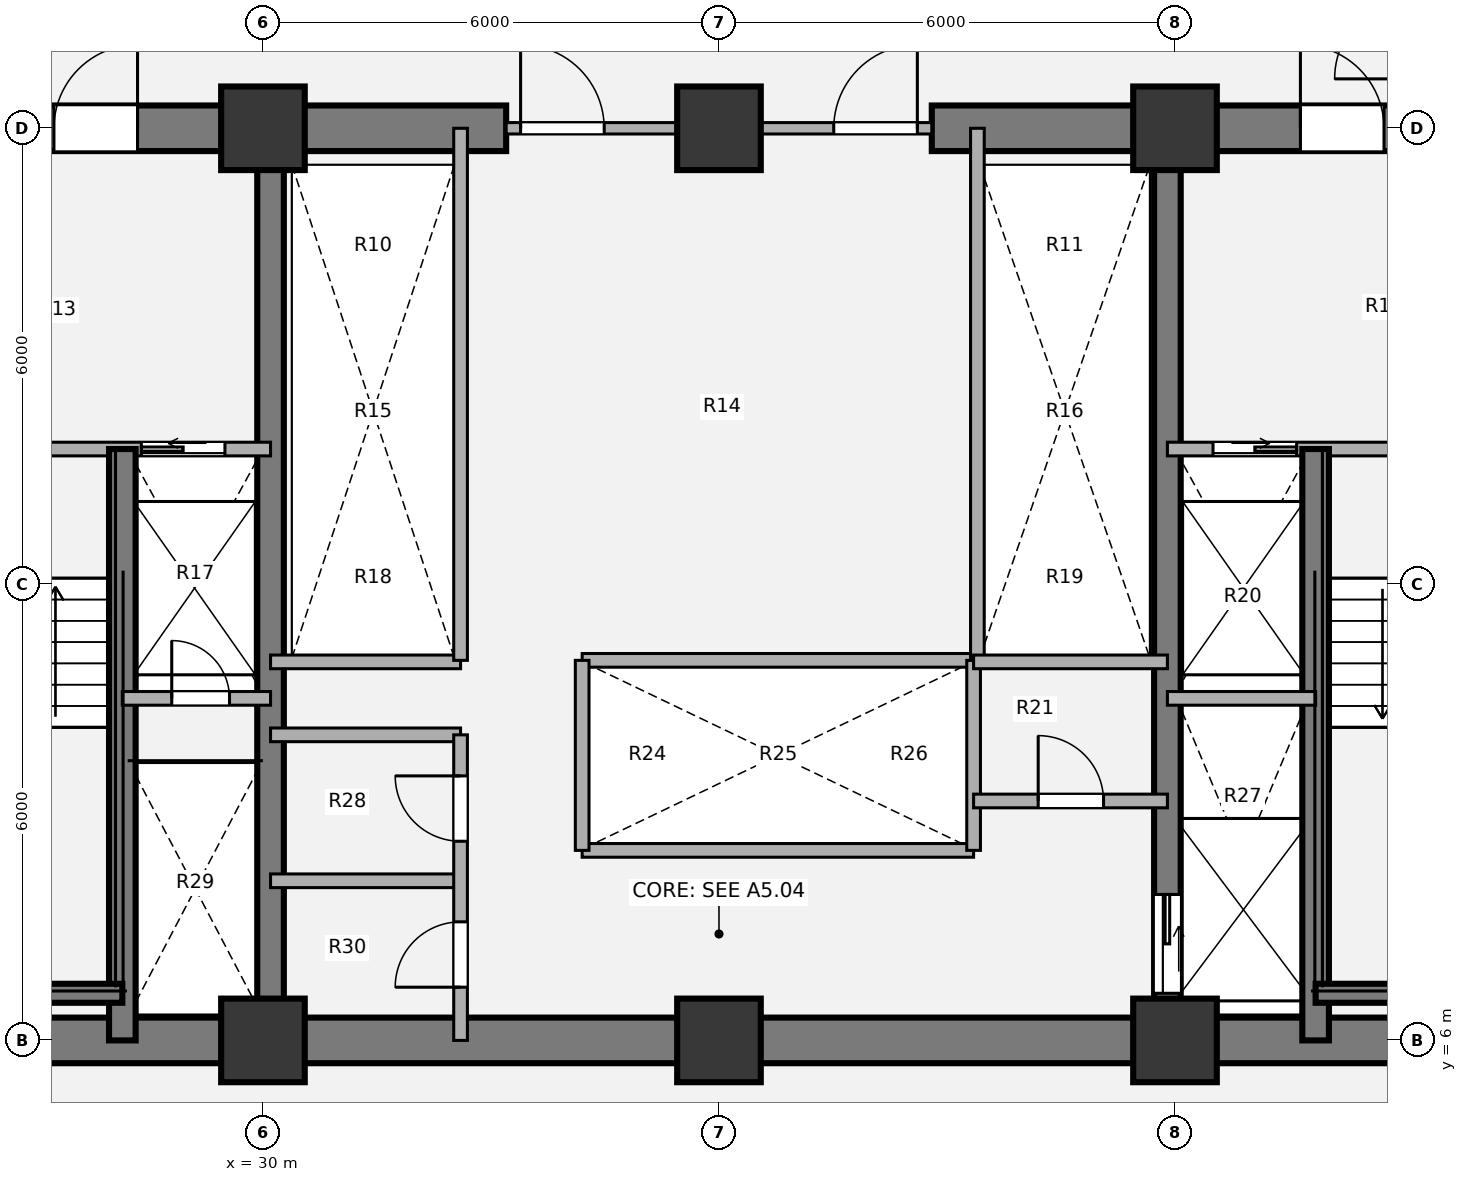
"""IFC4 building model, lengths in metres.
Left out: names, types, materials, properties, quantities, classifications, styles, units other than length and angle.
Written with IfcOpenShell. Run it as: python <this file> out.ifc"""

import sys

from ifc_helpers import new_model, si_unit, direction, frame, frame_2d, origin, origin_2d, place, context, subcontext, project, spatial, rectangle, extrude, source, transform, mapped, element, fill, save


model = new_model("IFC4")
c1 = context("Model", 3, precision=1e-05, world=origin(), true_north=direction((0.0, 1.0)))
c2 = subcontext(c1, "Body", "Model", "MODEL_VIEW")
j1 = project(units=[si_unit("LENGTHUNIT", "METRE"), si_unit("PLANEANGLEUNIT", "RADIAN")], contexts=[c1])
p1 = place(None, origin())
s1 = spatial("IfcSite", under=j1, at=p1, CompositionType="ELEMENT")
p2 = place(p1, origin())
s2 = spatial("IfcBuilding", under=s1, at=p2, CompositionType="ELEMENT")
p3 = place(p2, frame((0.0, 0.0, 79.92)))
s3 = spatial("IfcBuildingStorey", under=s2, at=p3, CompositionType="ELEMENT", Elevation=79.92)
m1 = source(origin(), c2, "Body", "SweptSolid", [
    extrude(rectangle(XDim=1.1, YDim=1.1, at=origin_2d()), origin(), (0.0, 0.0, 1.0), 5.4),
])
for number, where, z_axis, x_axis in (
    (1, (30.0, 6.0, 0.0), (0.0, 0.0, 1.0), (1.0, 0.0, 0.0)),
    (2, (36.0, 6.0, 0.0), (0.0, 0.0, 1.0), (1.0, 0.0, 0.0)),
    (3, (42.0, 6.0, 0.0), (0.0, 0.0, 1.0), (1.0, 0.0, 0.0)),
    (4, (30.0, 18.0, 0.0), (0.0, 0.0, 1.0), (1.0, 0.0, 0.0)),
    (5, (36.0, 18.0, 0.0), (0.0, 0.0, 1.0), (1.0, 0.0, 0.0)),
    (6, (42.0, 18.0, 0.0), (0.0, 0.0, 1.0), (1.0, 0.0, 0.0)),
):
    element("IfcColumn", number, at=place(p3, frame(where, z_axis=z_axis, x_axis=x_axis)), inside=s3, PredefinedType="COLUMN", context=c2, shape_type="MappedRepresentation", body=[
        mapped(m1, transform((0.0, 0.0, 0.0), x_axis=(1.0, 0.0, 0.0), y_axis=(0.0, 1.0, 0.0), z_axis=(0.0, 0.0, 1.0), scale=1.0)),
    ])
p4 = place(p3, frame((48.3, 6.0, 0.0), z_axis=(0.0, 0.0, 1.0), x_axis=(-1.0, 0.0, 0.0)))
e7 = element("IfcWall", 7, at=p4, inside=s3, PredefinedType="SHEAR", context=c2, shape_type="SweptSolid", body=[
    extrude(rectangle(XDim=24.6, YDim=0.6, at=frame_2d((12.3, 0.0))), origin(), (0.0, 0.0, 1.0), 5.4),
])
p5 = place(p3, frame((23.7, 18.0, 0.0), z_axis=(0.0, 0.0, 1.0), x_axis=(1.0, 0.0, 0.0)))
e8 = element("IfcWall", 8, at=p5, inside=s3, PredefinedType="SHEAR", context=c2, shape_type="SweptSolid", body=[
    extrude(rectangle(XDim=9.5, YDim=0.6, at=frame_2d((4.75, 0.0))), origin(), (0.0, 0.0, 1.0), 5.4),
])
p6 = place(p5, frame((1.55, 0.0, 0.0)))
e9 = element("IfcOpeningElement", 9, at=p6, cuts=e8, PredefinedType="OPENING", context=c2, shape_type="SweptSolid", body=[
    extrude(rectangle(XDim=1.1, YDim=2.1, at=origin_2d()), frame((0.55, 0.31, 1.05), z_axis=(0.0, -1.0, 0.0), x_axis=(1.0, 0.0, 0.0)), (0.0, 0.0, 1.0), 0.62),
])
p7 = place(p5, frame((3.55, 0.0, 0.0)))
e10 = element("IfcOpeningElement", 10, at=p7, cuts=e8, PredefinedType="OPENING", context=c2, shape_type="SweptSolid", body=[
    extrude(rectangle(XDim=1.1, YDim=2.1, at=origin_2d()), frame((0.55, 0.31, 1.05), z_axis=(0.0, -1.0, 0.0), x_axis=(1.0, 0.0, 0.0)), (0.0, 0.0, 1.0), 0.62),
])
p8 = place(p3, frame((38.8, 18.0, 0.0), z_axis=(0.0, 0.0, 1.0), x_axis=(1.0, 0.0, 0.0)))
e11 = element("IfcWall", 11, at=p8, inside=s3, PredefinedType="SHEAR", context=c2, shape_type="SweptSolid", body=[
    extrude(rectangle(XDim=9.5, YDim=0.6, at=frame_2d((4.75, 0.0))), origin(), (0.0, 0.0, 1.0), 5.4),
])
p9 = place(p8, frame((4.85, 0.0, 0.0)))
e12 = element("IfcOpeningElement", 12, at=p9, cuts=e11, PredefinedType="OPENING", context=c2, shape_type="SweptSolid", body=[
    extrude(rectangle(XDim=1.1, YDim=2.1, at=origin_2d()), frame((0.55, 0.31, 1.05), z_axis=(0.0, -1.0, 0.0), x_axis=(1.0, 0.0, 0.0)), (0.0, 0.0, 1.0), 0.62),
])
p10 = place(p8, frame((6.85, 0.0, 0.0)))
e13 = element("IfcOpeningElement", 13, at=p10, cuts=e11, PredefinedType="OPENING", context=c2, shape_type="SweptSolid", body=[
    extrude(rectangle(XDim=1.1, YDim=2.1, at=origin_2d()), frame((0.55, 0.31, 1.05), z_axis=(0.0, -1.0, 0.0), x_axis=(1.0, 0.0, 0.0)), (0.0, 0.0, 1.0), 0.62),
])
p11 = place(p3, frame((30.1, 6.0, 0.0), z_axis=(0.0, 0.0, 1.0), x_axis=(0.0, 1.0, 0.0)))
e14 = element("IfcWall", 14, at=p11, inside=s3, PredefinedType="SHEAR", context=c2, shape_type="SweptSolid", body=[
    extrude(rectangle(XDim=12.0, YDim=0.35, at=frame_2d((6.0, 0.0))), origin(), (0.0, 0.0, 1.0), 5.4),
])
p12 = place(p3, frame((41.9, 18.0, 0.0), z_axis=(0.0, 0.0, 1.0), x_axis=(0.0, -1.0, 0.0)))
e15 = element("IfcWall", 15, at=p12, inside=s3, PredefinedType="SHEAR", context=c2, shape_type="SweptSolid", body=[
    extrude(rectangle(XDim=12.0, YDim=0.35, at=frame_2d((6.0, 0.0))), origin(), (0.0, 0.0, 1.0), 5.4),
])
p13 = place(p12, frame((10.08, 0.0, 0.0)))
e16 = element("IfcOpeningElement", 16, at=p13, cuts=e15, PredefinedType="OPENING", context=c2, shape_type="SweptSolid", body=[
    extrude(rectangle(XDim=1.3, YDim=2.1, at=origin_2d()), frame((0.65, 0.185, 1.05), z_axis=(0.0, -1.0, 0.0), x_axis=(1.0, 0.0, 0.0)), (0.0, 0.0, 1.0), 0.37),
])
for number, where, z_axis, x_axis in (
    (17, (34.2, 11.0, 0.0), (0.0, 0.0, 1.0), (1.0, 0.0, 0.0)),
    (18, (34.2, 8.5, 0.0), (0.0, 0.0, 1.0), (1.0, 0.0, 0.0)),
):
    element("IfcWall", number, at=place(p3, frame(where, z_axis=z_axis, x_axis=x_axis)), inside=s3, PredefinedType="PARTITIONING", context=c2, shape_type="SweptSolid", body=[
        extrude(rectangle(XDim=5.15, YDim=0.18, at=frame_2d((2.575, 0.0))), origin(), (0.0, 0.0, 1.0), 5.05),
    ])
for number, where, z_axis, x_axis in (
    (19, (34.2, 8.5, 0.0), (0.0, 0.0, 1.0), (0.0, 1.0, 0.0)),
    (20, (39.35, 8.5, 0.0), (0.0, 0.0, 1.0), (0.0, 1.0, 0.0)),
):
    element("IfcWall", number, at=place(p3, frame(where, z_axis=z_axis, x_axis=x_axis)), inside=s3, PredefinedType="PARTITIONING", context=c2, shape_type="SweptSolid", body=[
        extrude(rectangle(XDim=2.5, YDim=0.18, at=frame_2d((1.25, 0.0))), origin(), (0.0, 0.0, 1.0), 5.05),
    ])
p14 = place(p3, frame((39.4, 11.0, 0.0), z_axis=(0.0, 0.0, 1.0), x_axis=(0.0, 1.0, 0.0)))
e21 = element("IfcWall", 21, at=p14, inside=s3, PredefinedType="PARTITIONING", context=c2, shape_type="SweptSolid", body=[
    extrude(rectangle(XDim=7.0, YDim=0.18, at=frame_2d((3.5, 0.0))), origin(), (0.0, 0.0, 1.0), 5.05),
])
p15 = place(p3, frame((30.1, 10.98, 0.0), z_axis=(0.0, 0.0, 1.0), x_axis=(1.0, 0.0, 0.0)))
e22 = element("IfcWall", 22, at=p15, inside=s3, PredefinedType="PARTITIONING", context=c2, shape_type="SweptSolid", body=[
    extrude(rectangle(XDim=2.5, YDim=0.18, at=frame_2d((1.25, 0.0))), origin(), (0.0, 0.0, 1.0), 5.05),
])
p16 = place(p3, frame((39.35, 10.98, 0.0), z_axis=(0.0, 0.0, 1.0), x_axis=(1.0, 0.0, 0.0)))
e23 = element("IfcWall", 23, at=p16, inside=s3, PredefinedType="PARTITIONING", context=c2, shape_type="SweptSolid", body=[
    extrude(rectangle(XDim=2.55, YDim=0.18, at=frame_2d((1.275, 0.0))), origin(), (0.0, 0.0, 1.0), 5.05),
])
for number, where, z_axis, x_axis in (
    (24, (30.1, 8.1, 0.0), (0.0, 0.0, 1.0), (1.0, 0.0, 0.0)),
    (25, (30.1, 10.02, 0.0), (0.0, 0.0, 1.0), (1.0, 0.0, 0.0)),
):
    element("IfcWall", number, at=place(p3, frame(where, z_axis=z_axis, x_axis=x_axis)), inside=s3, PredefinedType="PARTITIONING", context=c2, shape_type="SweptSolid", body=[
        extrude(rectangle(XDim=2.5, YDim=0.18, at=frame_2d((1.25, 0.0))), origin(), (0.0, 0.0, 1.0), 5.05),
    ])
p17 = place(p3, frame((32.6, 6.0, 0.0), z_axis=(0.0, 0.0, 1.0), x_axis=(0.0, 1.0, 0.0)))
e26 = element("IfcWall", 26, at=p17, inside=s3, PredefinedType="PARTITIONING", context=c2, shape_type="SweptSolid", body=[
    extrude(rectangle(XDim=4.02, YDim=0.18, at=frame_2d((2.01, 0.0))), origin(), (0.0, 0.0, 1.0), 5.05),
])
p18 = place(p17, frame((0.7, 0.0, 0.0)))
e27 = element("IfcOpeningElement", 27, at=p18, cuts=e26, PredefinedType="OPENING", context=c2, shape_type="SweptSolid", body=[
    extrude(rectangle(XDim=0.86, YDim=2.1, at=origin_2d()), frame((0.43, 0.1, 1.05), z_axis=(0.0, -1.0, 0.0), x_axis=(1.0, 0.0, 0.0)), (0.0, 0.0, 1.0), 0.2),
])
p19 = place(p17, frame((2.62, 0.0, 0.0)))
e28 = element("IfcOpeningElement", 28, at=p19, cuts=e26, PredefinedType="OPENING", context=c2, shape_type="SweptSolid", body=[
    extrude(rectangle(XDim=0.86, YDim=2.1, at=origin_2d()), frame((0.43, 0.1, 1.05), z_axis=(0.0, -1.0, 0.0), x_axis=(1.0, 0.0, 0.0)), (0.0, 0.0, 1.0), 0.2),
])
p20 = place(p3, frame((39.35, 9.15, 0.0), z_axis=(0.0, 0.0, 1.0), x_axis=(1.0, 0.0, 0.0)))
e29 = element("IfcWall", 29, at=p20, inside=s3, PredefinedType="PARTITIONING", context=c2, shape_type="SweptSolid", body=[
    extrude(rectangle(XDim=2.55, YDim=0.18, at=frame_2d((1.275, 0.0))), origin(), (0.0, 0.0, 1.0), 5.05),
])
p21 = place(p20, frame((0.85, 0.0, 0.0)))
e30 = element("IfcOpeningElement", 30, at=p21, cuts=e29, PredefinedType="OPENING", context=c2, shape_type="SweptSolid", body=[
    extrude(rectangle(XDim=0.86, YDim=2.1, at=origin_2d()), frame((0.43, 0.1, 1.05), z_axis=(0.0, -1.0, 0.0), x_axis=(1.0, 0.0, 0.0)), (0.0, 0.0, 1.0), 0.2),
])
p22 = place(p3, frame((33.2, 18.0, 0.0), z_axis=(0.0, 0.0, 1.0), x_axis=(1.0, 0.0, 0.0)))
e31 = element("IfcWall", 31, at=p22, inside=s3, PredefinedType="PARTITIONING", context=c2, shape_type="SweptSolid", body=[
    extrude(rectangle(XDim=5.6, YDim=0.15, at=frame_2d((2.8, 0.0))), origin(), (0.0, 0.0, 1.0), 3.865),
])
p23 = place(p22, frame((0.19, 0.0, 0.0)))
e32 = element("IfcOpeningElement", 32, at=p23, cuts=e31, PredefinedType="OPENING", context=c2, shape_type="SweptSolid", body=[
    extrude(rectangle(XDim=1.1, YDim=2.1, at=origin_2d()), frame((0.55, 0.085, 1.05), z_axis=(0.0, -1.0, 0.0), x_axis=(1.0, 0.0, 0.0)), (0.0, 0.0, 1.0), 0.17),
])
p24 = place(p22, frame((4.31, 0.0, 0.0)))
e33 = element("IfcOpeningElement", 33, at=p24, cuts=e31, PredefinedType="OPENING", context=c2, shape_type="SweptSolid", body=[
    extrude(rectangle(XDim=1.1, YDim=2.1, at=origin_2d()), frame((0.55, 0.085, 1.05), z_axis=(0.0, -1.0, 0.0), x_axis=(1.0, 0.0, 0.0)), (0.0, 0.0, 1.0), 0.17),
])
p25 = place(p3, frame((24.0, 13.78, 0.0), z_axis=(0.0, 0.0, 1.0), x_axis=(1.0, 0.0, 0.0)))
e34 = element("IfcWall", 34, at=p25, inside=s3, PredefinedType="PARTITIONING", context=c2, shape_type="SweptSolid", body=[
    extrude(rectangle(XDim=6.1, YDim=0.18, at=frame_2d((3.05, 0.0))), origin(), (0.0, 0.0, 1.0), 2.229),
])
p26 = place(p25, frame((1.15, 0.0, 0.0)))
e35 = element("IfcOpeningElement", 35, at=p26, cuts=e34, PredefinedType="OPENING", context=c2, shape_type="SweptSolid", body=[
    extrude(rectangle(XDim=1.1, YDim=2.1, at=origin_2d()), frame((0.55, 0.1, 1.05), z_axis=(0.0, -1.0, 0.0), x_axis=(1.0, 0.0, 0.0)), (0.0, 0.0, 1.0), 0.2),
])
p27 = place(p25, frame((4.4, 0.0, 0.0)))
e36 = element("IfcOpeningElement", 36, at=p27, cuts=e34, PredefinedType="OPENING", context=c2, shape_type="SweptSolid", body=[
    extrude(rectangle(XDim=1.1, YDim=2.1, at=origin_2d()), frame((0.55, 0.1, 1.05), z_axis=(0.0, -1.0, 0.0), x_axis=(1.0, 0.0, 0.0)), (0.0, 0.0, 1.0), 0.2),
])
p28 = place(p3, frame((28.15, 6.0, 0.0), z_axis=(0.0, 0.0, 1.0), x_axis=(0.0, 1.0, 0.0)))
e37 = element("IfcWall", 37, at=p28, inside=s3, PredefinedType="SHEAR", context=c2, shape_type="SweptSolid", body=[
    extrude(rectangle(XDim=7.78, YDim=0.35, at=frame_2d((3.89, 0.0))), origin(), (0.0, 0.0, 1.0), 5.4),
])
p29 = place(p3, frame((24.58, 6.62, 0.0), z_axis=(0.0, 0.0, 1.0), x_axis=(1.0, 0.0, 0.0)))
e38 = element("IfcWall", 38, at=p29, inside=s3, PredefinedType="SHEAR", context=c2, shape_type="SweptSolid", body=[
    extrude(rectangle(XDim=3.57, YDim=0.25, at=frame_2d((1.785, 0.0))), origin(), (0.0, 0.0, 1.0), 5.4),
])
p30 = place(p3, frame((28.15, 10.5, 0.0), z_axis=(0.0, 0.0, 1.0), x_axis=(1.0, 0.0, 0.0)))
e39 = element("IfcWall", 39, at=p30, inside=s3, PredefinedType="PARTITIONING", context=c2, shape_type="SweptSolid", body=[
    extrude(rectangle(XDim=1.95, YDim=0.18, at=frame_2d((0.975, 0.0))), origin(), (0.0, 0.0, 1.0), 5.05),
])
p31 = place(p30, frame((0.65, 0.0, 0.0)))
e40 = element("IfcOpeningElement", 40, at=p31, cuts=e39, PredefinedType="OPENING", context=c2, shape_type="SweptSolid", body=[
    extrude(rectangle(XDim=0.76, YDim=2.05, at=origin_2d()), frame((0.38, 0.1, 1.025), z_axis=(0.0, -1.0, 0.0), x_axis=(1.0, 0.0, 0.0)), (0.0, 0.0, 1.0), 0.2),
])
p32 = place(p3, frame((41.9, 13.78, 0.0), z_axis=(0.0, 0.0, 1.0), x_axis=(1.0, 0.0, 0.0)))
e41 = element("IfcWall", 41, at=p32, inside=s3, PredefinedType="PARTITIONING", context=c2, shape_type="SweptSolid", body=[
    extrude(rectangle(XDim=6.1, YDim=0.18, at=frame_2d((3.05, 0.0))), origin(), (0.0, 0.0, 1.0), 2.229),
])
p33 = place(p32, frame((0.6, 0.0, 0.0)))
e42 = element("IfcOpeningElement", 42, at=p33, cuts=e41, PredefinedType="OPENING", context=c2, shape_type="SweptSolid", body=[
    extrude(rectangle(XDim=1.1, YDim=2.1, at=origin_2d()), frame((0.55, 0.1, 1.05), z_axis=(0.0, -1.0, 0.0), x_axis=(1.0, 0.0, 0.0)), (0.0, 0.0, 1.0), 0.2),
])
p34 = place(p32, frame((3.8, 0.0, 0.0)))
e43 = element("IfcOpeningElement", 43, at=p34, cuts=e41, PredefinedType="OPENING", context=c2, shape_type="SweptSolid", body=[
    extrude(rectangle(XDim=1.1, YDim=2.1, at=origin_2d()), frame((0.55, 0.1, 1.05), z_axis=(0.0, -1.0, 0.0), x_axis=(1.0, 0.0, 0.0)), (0.0, 0.0, 1.0), 0.2),
])
p35 = place(p3, frame((43.85, 6.0, 0.0), z_axis=(0.0, 0.0, 1.0), x_axis=(0.0, 1.0, 0.0)))
e44 = element("IfcWall", 44, at=p35, inside=s3, PredefinedType="SHEAR", context=c2, shape_type="SweptSolid", body=[
    extrude(rectangle(XDim=7.78, YDim=0.35, at=frame_2d((3.89, 0.0))), origin(), (0.0, 0.0, 1.0), 5.4),
])
p36 = place(p3, frame((43.85, 6.62, 0.0), z_axis=(0.0, 0.0, 1.0), x_axis=(1.0, 0.0, 0.0)))
e45 = element("IfcWall", 45, at=p36, inside=s3, PredefinedType="SHEAR", context=c2, shape_type="SweptSolid", body=[
    extrude(rectangle(XDim=3.57, YDim=0.25, at=frame_2d((1.785, 0.0))), origin(), (0.0, 0.0, 1.0), 5.4),
])
p37 = place(p3, frame((41.9, 10.5, 0.0), z_axis=(0.0, 0.0, 1.0), x_axis=(1.0, 0.0, 0.0)))
e46 = element("IfcWall", 46, at=p37, inside=s3, PredefinedType="PARTITIONING", context=c2, shape_type="SweptSolid", body=[
    extrude(rectangle(XDim=1.95, YDim=0.18, at=frame_2d((0.975, 0.0))), origin(), (0.0, 0.0, 1.0), 5.05),
])
p38 = place(p3, frame((32.6, 11.0, 0.0), z_axis=(0.0, 0.0, 1.0), x_axis=(0.0, 1.0, 0.0)))
e47 = element("IfcWall", 47, at=p38, inside=s3, PredefinedType="PARTITIONING", context=c2, shape_type="SweptSolid", body=[
    extrude(rectangle(XDim=7.0, YDim=0.18, at=frame_2d((3.5, 0.0))), origin(), (0.0, 0.0, 1.0), 5.05),
])
m2 = source(origin(), c2, "Body", "SweptSolid", [
    extrude(rectangle(XDim=0.86, YDim=2.1, at=origin_2d()), frame((0.43, 0.025, 1.05), z_axis=(0.0, -1.0, 0.0), x_axis=(1.0, 0.0, 0.0)), (0.0, 0.0, 1.0), 0.05),
])
p39 = place(p18, origin())
e48 = element("IfcDoor", 48, at=p39, inside=s3, OperationType="SINGLE_SWING_LEFT", PredefinedType="DOOR", context=c2, shape_type="MappedRepresentation", body=[
    mapped(m2, transform((0.0, 0.0, 0.0), x_axis=(1.0, 0.0, 0.0), y_axis=(0.0, 1.0, 0.0), z_axis=(0.0, 0.0, 1.0), scale=1.0)),
])
fill(e27, e48)
p40 = place(p19, origin())
e49 = element("IfcDoor", 49, at=p40, inside=s3, OperationType="SINGLE_SWING_RIGHT", PredefinedType="DOOR", context=c2, shape_type="MappedRepresentation", body=[
    mapped(m2, transform((0.0, 0.0, 0.0), x_axis=(1.0, 0.0, 0.0), y_axis=(0.0, 1.0, 0.0), z_axis=(0.0, 0.0, 1.0), scale=1.0)),
])
fill(e28, e49)
p41 = place(p21, origin())
e50 = element("IfcDoor", 50, at=p41, inside=s3, OperationType="SINGLE_SWING_LEFT", PredefinedType="DOOR", context=c2, shape_type="MappedRepresentation", body=[
    mapped(m2, transform((0.0, 0.0, 0.0), x_axis=(1.0, 0.0, 0.0), y_axis=(0.0, 1.0, 0.0), z_axis=(0.0, 0.0, 1.0), scale=1.0)),
])
fill(e30, e50)
m3 = source(origin(), c2, "Body", "SweptSolid", [
    extrude(rectangle(XDim=1.1, YDim=2.1, at=origin_2d()), frame((0.55, 0.025, 1.05), z_axis=(0.0, -1.0, 0.0), x_axis=(1.0, 0.0, 0.0)), (0.0, 0.0, 1.0), 0.05),
])
p42 = place(p23, origin())
e51 = element("IfcDoor", 51, at=p42, inside=s3, OperationType="SINGLE_SWING_LEFT", PredefinedType="DOOR", context=c2, shape_type="MappedRepresentation", body=[
    mapped(m3, transform((0.0, 0.0, 0.0), x_axis=(1.0, 0.0, 0.0), y_axis=(0.0, 1.0, 0.0), z_axis=(0.0, 0.0, 1.0), scale=1.0)),
])
fill(e32, e51)
p43 = place(p24, origin())
e52 = element("IfcDoor", 52, at=p43, inside=s3, OperationType="SINGLE_SWING_RIGHT", PredefinedType="DOOR", context=c2, shape_type="MappedRepresentation", body=[
    mapped(m3, transform((0.0, 0.0, 0.0), x_axis=(1.0, 0.0, 0.0), y_axis=(0.0, 1.0, 0.0), z_axis=(0.0, 0.0, 1.0), scale=1.0)),
])
fill(e33, e52)
m4 = source(origin(), c2, "Body", "SweptSolid", [
    extrude(rectangle(XDim=1.1, YDim=2.1, at=origin_2d()), frame((0.55, 0.025, 1.05), z_axis=(0.0, -1.0, 0.0), x_axis=(1.0, 0.0, 0.0)), (0.0, 0.0, 1.0), 0.05),
])
p44 = place(p27, origin())
e53 = element("IfcDoor", 53, at=p44, inside=s3, OperationType="SLIDING_TO_LEFT", PredefinedType="DOOR", context=c2, shape_type="MappedRepresentation", body=[
    mapped(m4, transform((0.0, 0.0, 0.0), x_axis=(1.0, 0.0, 0.0), y_axis=(0.0, 1.0, 0.0), z_axis=(0.0, 0.0, 1.0), scale=1.0)),
])
fill(e36, e53)
m5 = source(origin(), c2, "Body", "SweptSolid", [
    extrude(rectangle(XDim=0.76, YDim=2.05, at=origin_2d()), frame((0.38, 0.025, 1.025), z_axis=(0.0, -1.0, 0.0), x_axis=(1.0, 0.0, 0.0)), (0.0, 0.0, 1.0), 0.05),
])
p45 = place(p31, origin())
e54 = element("IfcDoor", 54, at=p45, inside=s3, OperationType="SINGLE_SWING_LEFT", PredefinedType="DOOR", context=c2, shape_type="MappedRepresentation", body=[
    mapped(m5, transform((0.0, 0.0, 0.0), x_axis=(1.0, 0.0, 0.0), y_axis=(0.0, 1.0, 0.0), z_axis=(0.0, 0.0, 1.0), scale=1.0)),
])
fill(e40, e54)
p46 = place(p33, origin())
e55 = element("IfcDoor", 55, at=p46, inside=s3, OperationType="SLIDING_TO_RIGHT", PredefinedType="DOOR", context=c2, shape_type="MappedRepresentation", body=[
    mapped(m4, transform((0.0, 0.0, 0.0), x_axis=(1.0, 0.0, 0.0), y_axis=(0.0, 1.0, 0.0), z_axis=(0.0, 0.0, 1.0), scale=1.0)),
])
fill(e42, e55)
m6 = source(origin(), c2, "Body", "SweptSolid", [
    extrude(rectangle(XDim=1.3, YDim=2.1, at=origin_2d()), frame((0.65, 0.025, 1.05), z_axis=(0.0, -1.0, 0.0), x_axis=(1.0, 0.0, 0.0)), (0.0, 0.0, 1.0), 0.05),
])
p47 = place(p13, origin())
e56 = element("IfcDoor", 56, at=p47, inside=s3, OperationType="SLIDING_TO_LEFT", PredefinedType="DOOR", context=c2, shape_type="MappedRepresentation", body=[
    mapped(m6, transform((0.0, 0.0, 0.0), x_axis=(1.0, 0.0, 0.0), y_axis=(0.0, 1.0, 0.0), z_axis=(0.0, 0.0, 1.0), scale=1.0)),
])
fill(e16, e56)
p48 = place(p7, origin())
e57 = element("IfcDoor", 57, at=p48, inside=s3, OperationType="SINGLE_SWING_RIGHT", PredefinedType="DOOR", context=c2, shape_type="MappedRepresentation", body=[
    mapped(m3, transform((0.0, 0.0, 0.0), x_axis=(1.0, 0.0, 0.0), y_axis=(0.0, 1.0, 0.0), z_axis=(0.0, 0.0, 1.0), scale=1.0)),
])
fill(e10, e57)
p49 = place(p9, origin())
e58 = element("IfcDoor", 58, at=p49, inside=s3, OperationType="SINGLE_SWING_LEFT", PredefinedType="DOOR", context=c2, shape_type="MappedRepresentation", body=[
    mapped(m3, transform((0.0, 0.0, 0.0), x_axis=(1.0, 0.0, 0.0), y_axis=(0.0, 1.0, 0.0), z_axis=(0.0, 0.0, 1.0), scale=1.0)),
])
fill(e12, e58)
save(model, sys.argv[1])
